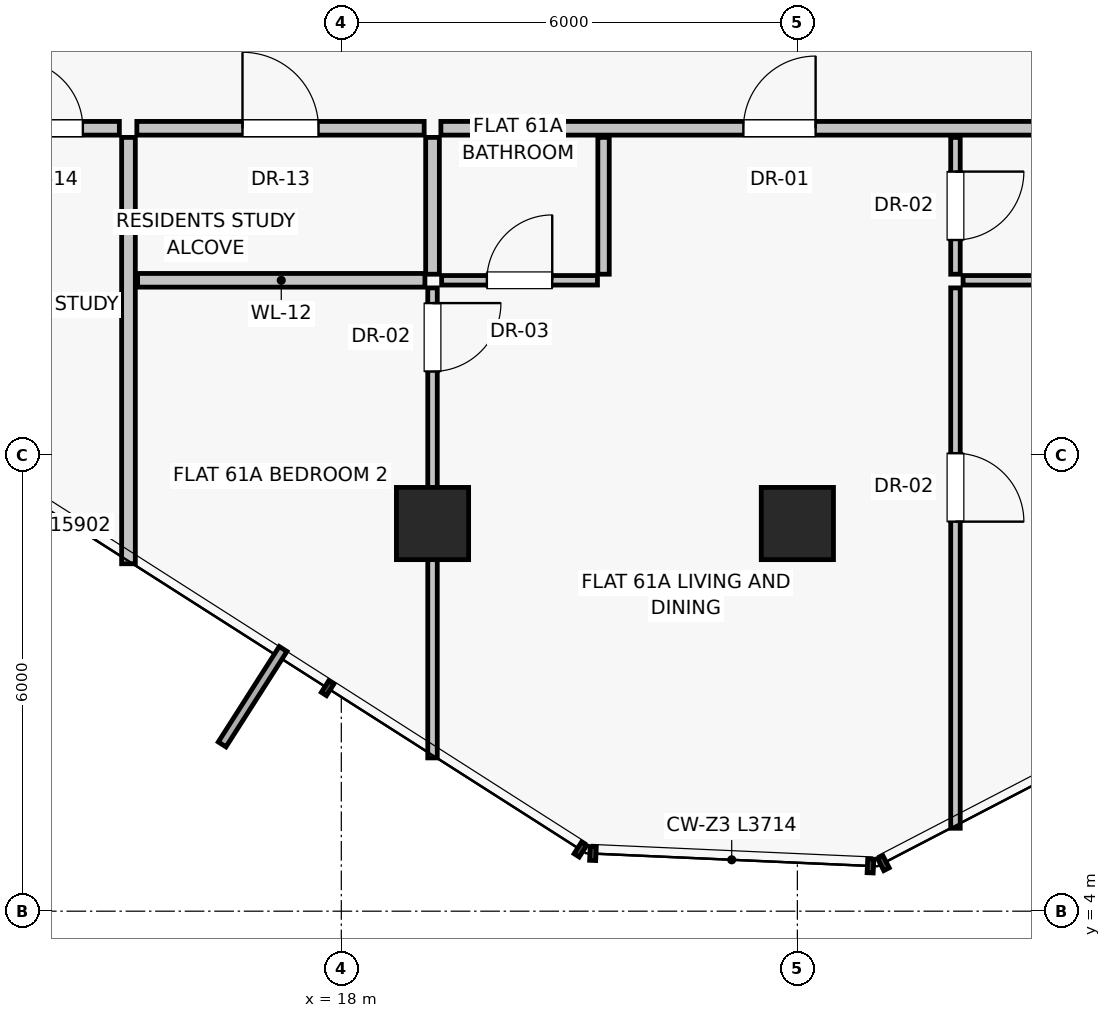
"""IFC4 building model, lengths in metres.
Left out: names, types, materials, properties, quantities, classifications, styles, units other than length and angle.
Written with IfcOpenShell. Run it as: python <this file> out.ifc"""

import sys

from ifc_helpers import new_model, si_unit, direction, frame, frame_2d, origin, origin_2d, place, context, subcontext, project, spatial, rectangle, extrude, source, transform, mapped, element, fill, save


model = new_model("IFC4")
c1 = context("Model", 3, precision=1e-05, world=origin(), true_north=direction((0.0, 1.0)))
c2 = subcontext(c1, "Body", "Model", "MODEL_VIEW")
j1 = project(units=[si_unit("LENGTHUNIT", "METRE"), si_unit("PLANEANGLEUNIT", "RADIAN")], contexts=[c1])
p1 = place(None, origin())
s1 = spatial("IfcSite", under=j1, at=p1, CompositionType="ELEMENT")
p2 = place(p1, origin())
s2 = spatial("IfcBuilding", under=s1, at=p2, CompositionType="ELEMENT")
p3 = place(p2, frame((0.0, 0.0, 215.65)))
s3 = spatial("IfcBuildingStorey", under=s2, at=p3, CompositionType="ELEMENT", Elevation=215.65)
for number, where, z_axis, x_axis in (
    (1, (19.2, 9.1, 0.0), (0.0, 0.0, 1.0), (1.0, 0.0, 0.0)),
    (2, (24.0, 9.1, 0.0), (0.0, 0.0, 1.0), (1.0, 0.0, 0.0)),
):
    element("IfcColumn", number, at=place(p3, frame(where, z_axis=z_axis, x_axis=x_axis)), inside=s3, PredefinedType="COLUMN", context=c2, shape_type="SweptSolid", body=[
        extrude(rectangle(XDim=0.95, YDim=0.95, at=origin_2d()), origin(), (0.0, 0.0, 1.0), 3.25),
    ])
p4 = place(p3, frame((15.2, 14.18, 0.0), z_axis=(0.0, 0.0, 1.0), x_axis=(0.0, -1.0, 0.0)))
e3 = element("IfcWall", 3, at=p4, inside=s3, PredefinedType="PARTITIONING", context=c2, shape_type="SweptSolid", body=[
    extrude(rectangle(XDim=5.609, YDim=0.18, at=frame_2d((2.805, 0.0))), origin(), (0.0, 0.0, 1.0), 3.015),
])
p5 = place(p3, frame((15.31, 14.3, 0.0), z_axis=(0.0, 0.0, 1.0), x_axis=(1.0, 0.0, 0.0)))
e4 = element("IfcWall", 4, at=p5, inside=s3, PredefinedType="PARTITIONING", context=c2, shape_type="SweptSolid", body=[
    extrude(rectangle(XDim=3.78, YDim=0.18, at=frame_2d((1.89, 0.0))), origin(), (0.0, 0.0, 1.0), 3.015),
])
p6 = place(p5, frame((1.39, 0.0, 0.0)))
e5 = element("IfcOpeningElement", 5, at=p6, cuts=e4, PredefinedType="OPENING", context=c2, shape_type="SweptSolid", body=[
    extrude(rectangle(XDim=1.0, YDim=2.01, at=frame_2d((0.5, 1.005))), frame((0.0, 0.1, 0.0), z_axis=(0.0, -1.0, 0.0), x_axis=(1.0, 0.0, 0.0)), (0.0, 0.0, 1.0), 0.2),
])
p7 = place(p3, frame((19.31, 14.3, 0.0), z_axis=(0.0, 0.0, 1.0), x_axis=(1.0, 0.0, 0.0)))
e6 = element("IfcWall", 6, at=p7, inside=s3, PredefinedType="PARTITIONING", context=c2, shape_type="SweptSolid", body=[
    extrude(rectangle(XDim=11.78, YDim=0.18, at=frame_2d((5.89, 0.0))), origin(), (0.0, 0.0, 1.0), 3.015),
])
p8 = place(p7, frame((3.98, 0.0, 0.0)))
e7 = element("IfcOpeningElement", 7, at=p8, cuts=e6, PredefinedType="OPENING", context=c2, shape_type="SweptSolid", body=[
    extrude(rectangle(XDim=0.95, YDim=2.02, at=frame_2d((0.475, 1.01))), frame((0.0, 0.1, 0.0), z_axis=(0.0, -1.0, 0.0), x_axis=(1.0, 0.0, 0.0)), (0.0, 0.0, 1.0), 0.2),
])
p9 = place(p3, frame((15.32, 12.3, 0.0), z_axis=(0.0, 0.0, 1.0), x_axis=(1.0, 0.0, 0.0)))
e8 = element("IfcWall", 8, at=p9, inside=s3, PredefinedType="PARTITIONING", context=c2, shape_type="SweptSolid", body=[
    extrude(rectangle(XDim=3.78, YDim=0.18, at=frame_2d((1.89, 0.0))), origin(), (0.0, 0.0, 1.0), 3.015),
])
p10 = place(p3, frame((19.2, 14.18, 0.0), z_axis=(0.0, 0.0, 1.0), x_axis=(0.0, -1.0, 0.0)))
e9 = element("IfcWall", 9, at=p10, inside=s3, PredefinedType="PARTITIONING", context=c2, shape_type="SweptSolid", body=[
    extrude(rectangle(XDim=1.8, YDim=0.18, at=frame_2d((0.9, 0.0))), origin(), (0.0, 0.0, 1.0), 3.015),
])
p11 = place(p3, frame((19.2, 12.2, 0.0), z_axis=(0.0, 0.0, 1.0), x_axis=(0.0, -1.0, 0.0)))
e10 = element("IfcWall", 10, at=p11, inside=s3, PredefinedType="PARTITIONING", context=c2, shape_type="SweptSolid", body=[
    extrude(rectangle(XDim=6.183, YDim=0.125, at=frame_2d((3.092, 0.0))), origin(), (0.0, 0.0, 1.0), 2.469),
])
p12 = place(p11, frame((0.2, 0.0, 0.0)))
e11 = element("IfcOpeningElement", 11, at=p12, cuts=e10, PredefinedType="OPENING", context=c2, shape_type="SweptSolid", body=[
    extrude(rectangle(XDim=0.9, YDim=2.01, at=frame_2d((0.45, 1.005))), frame((0.0, 0.073, 0.0), z_axis=(0.0, -1.0, 0.0), x_axis=(1.0, 0.0, 0.0)), (0.0, 0.0, 1.0), 0.145),
])
p13 = place(p3, frame((21.45, 14.18, 0.0), z_axis=(0.0, 0.0, 1.0), x_axis=(0.0, -1.0, 0.0)))
e12 = element("IfcWall", 12, at=p13, inside=s3, PredefinedType="PARTITIONING", context=c2, shape_type="SweptSolid", body=[
    extrude(rectangle(XDim=1.8, YDim=0.15, at=frame_2d((0.9, 0.0))), origin(), (0.0, 0.0, 1.0), 3.015),
])
p14 = place(p3, frame((19.32, 12.3, 0.0), z_axis=(0.0, 0.0, 1.0), x_axis=(1.0, 0.0, 0.0)))
e13 = element("IfcWall", 13, at=p14, inside=s3, PredefinedType="PARTITIONING", context=c2, shape_type="SweptSolid", body=[
    extrude(rectangle(XDim=2.05, YDim=0.125, at=frame_2d((1.025, 0.0))), origin(), (0.0, 0.0, 1.0), 3.015),
])
p15 = place(p14, frame((0.595, 0.0, 0.0)))
e14 = element("IfcOpeningElement", 14, at=p15, cuts=e13, PredefinedType="OPENING", context=c2, shape_type="SweptSolid", body=[
    extrude(rectangle(XDim=0.86, YDim=2.01, at=frame_2d((0.43, 1.005))), frame((0.0, 0.073, 0.0), z_axis=(0.0, -1.0, 0.0), x_axis=(1.0, 0.0, 0.0)), (0.0, 0.0, 1.0), 0.145),
])
p16 = place(p3, frame((26.08, 14.18, 0.0), z_axis=(0.0, 0.0, 1.0), x_axis=(0.0, -1.0, 0.0)))
e15 = element("IfcWall", 15, at=p16, inside=s3, PredefinedType="PARTITIONING", context=c2, shape_type="SweptSolid", body=[
    extrude(rectangle(XDim=1.8, YDim=0.125, at=frame_2d((0.9, 0.0))), origin(), (0.0, 0.0, 1.0), 3.015),
])
p17 = place(p16, frame((0.45, 0.0, 0.0)))
e16 = element("IfcOpeningElement", 16, at=p17, cuts=e15, PredefinedType="OPENING", context=c2, shape_type="SweptSolid", body=[
    extrude(rectangle(XDim=0.9, YDim=2.01, at=frame_2d((0.45, 1.005))), frame((0.0, 0.073, 0.0), z_axis=(0.0, -1.0, 0.0), x_axis=(1.0, 0.0, 0.0)), (0.0, 0.0, 1.0), 0.145),
])
p18 = place(p3, frame((26.18, 12.3, 0.0), z_axis=(0.0, 0.0, 1.0), x_axis=(1.0, 0.0, 0.0)))
e17 = element("IfcWall", 17, at=p18, inside=s3, PredefinedType="PARTITIONING", context=c2, shape_type="SweptSolid", body=[
    extrude(rectangle(XDim=4.9, YDim=0.125, at=frame_2d((2.45, 0.0))), origin(), (0.0, 0.0, 1.0), 3.015),
])
p19 = place(p3, frame((26.08, 12.2, 0.0), z_axis=(0.0, 0.0, 1.0), x_axis=(0.0, -1.0, 0.0)))
e18 = element("IfcWall", 18, at=p19, inside=s3, PredefinedType="PARTITIONING", context=c2, shape_type="SweptSolid", body=[
    extrude(rectangle(XDim=7.109, YDim=0.125, at=frame_2d((3.555, 0.0))), origin(), (0.0, 0.0, 1.0), 3.015),
])
p20 = place(p19, frame((2.175, 0.0, 0.0)))
e19 = element("IfcOpeningElement", 19, at=p20, cuts=e18, PredefinedType="OPENING", context=c2, shape_type="SweptSolid", body=[
    extrude(rectangle(XDim=0.9, YDim=2.01, at=frame_2d((0.45, 1.005))), frame((0.0, 0.073, 0.0), z_axis=(0.0, -1.0, 0.0), x_axis=(1.0, 0.0, 0.0)), (0.0, 0.0, 1.0), 0.145),
])
p21 = place(p3, frame((13.22, 14.3, 0.0), z_axis=(0.0, 0.0, 1.0), x_axis=(1.0, 0.0, 0.0)))
e20 = element("IfcWall", 20, at=p21, inside=s3, PredefinedType="PARTITIONING", context=c2, shape_type="SweptSolid", body=[
    extrude(rectangle(XDim=1.86, YDim=0.18, at=frame_2d((0.93, 0.0))), origin(), (0.0, 0.0, 1.0), 3.015),
])
p22 = place(p21, frame((0.48, 0.0, 0.0)))
e21 = element("IfcOpeningElement", 21, at=p22, cuts=e20, PredefinedType="OPENING", context=c2, shape_type="SweptSolid", body=[
    extrude(rectangle(XDim=0.9, YDim=2.01, at=frame_2d((0.45, 1.005))), frame((0.0, 0.1, 0.0), z_axis=(0.0, -1.0, 0.0), x_axis=(1.0, 0.0, 0.0)), (0.0, 0.0, 1.0), 0.2),
])
m1 = source(origin(), c2, "Body", "SweptSolid", [
    extrude(rectangle(XDim=1.0, YDim=2.01, at=frame_2d((0.5, 1.005))), frame((0.0, 0.025, 0.0), z_axis=(0.0, -1.0, 0.0), x_axis=(1.0, 0.0, 0.0)), (0.0, 0.0, 1.0), 0.05),
])
p23 = place(p6, origin())
e22 = element("IfcDoor", 22, at=p23, inside=s3, OperationType="SINGLE_SWING_LEFT", PredefinedType="DOOR", context=c2, shape_type="MappedRepresentation", body=[
    mapped(m1, transform((0.0, 0.0, 0.0), scale=1.0)),
])
fill(e5, e22)
m2 = source(origin(), c2, "Body", "SweptSolid", [
    extrude(rectangle(XDim=0.95, YDim=2.02, at=frame_2d((0.475, 1.01))), frame((0.0, 0.025, 0.0), z_axis=(0.0, -1.0, 0.0), x_axis=(1.0, 0.0, 0.0)), (0.0, 0.0, 1.0), 0.05),
])
p24 = place(p8, origin())
e23 = element("IfcDoor", 23, at=p24, inside=s3, OperationType="SINGLE_SWING_RIGHT", PredefinedType="DOOR", context=c2, shape_type="MappedRepresentation", body=[
    mapped(m2, transform((0.0, 0.0, 0.0), scale=1.0)),
])
fill(e7, e23)
m3 = source(origin(), c2, "Body", "SweptSolid", [
    extrude(rectangle(XDim=0.9, YDim=2.01, at=frame_2d((0.45, 1.005))), frame((0.0, 0.025, 0.0), z_axis=(0.0, -1.0, 0.0), x_axis=(1.0, 0.0, 0.0)), (0.0, 0.0, 1.0), 0.05),
])
p25 = place(p12, origin())
e24 = element("IfcDoor", 24, at=p25, inside=s3, OperationType="SINGLE_SWING_LEFT", PredefinedType="DOOR", context=c2, shape_type="MappedRepresentation", body=[
    mapped(m3, transform((0.0, 0.0, 0.0), scale=1.0)),
])
fill(e11, e24)
m4 = source(origin(), c2, "Body", "SweptSolid", [
    extrude(rectangle(XDim=0.86, YDim=2.01, at=frame_2d((0.43, 1.005))), frame((0.0, 0.025, 0.0), z_axis=(0.0, -1.0, 0.0), x_axis=(1.0, 0.0, 0.0)), (0.0, 0.0, 1.0), 0.05),
])
p26 = place(p15, origin())
e25 = element("IfcDoor", 25, at=p26, inside=s3, OperationType="SINGLE_SWING_RIGHT", PredefinedType="DOOR", context=c2, shape_type="MappedRepresentation", body=[
    mapped(m4, transform((0.0, 0.0, 0.0), scale=1.0)),
])
fill(e14, e25)
p27 = place(p17, origin())
e26 = element("IfcDoor", 26, at=p27, inside=s3, OperationType="SINGLE_SWING_LEFT", PredefinedType="DOOR", context=c2, shape_type="MappedRepresentation", body=[
    mapped(m3, transform((0.0, 0.0, 0.0), scale=1.0)),
])
fill(e16, e26)
p28 = place(p20, origin())
e27 = element("IfcDoor", 27, at=p28, inside=s3, OperationType="SINGLE_SWING_RIGHT", PredefinedType="DOOR", context=c2, shape_type="MappedRepresentation", body=[
    mapped(m3, transform((0.0, 0.0, 0.0), scale=1.0)),
])
fill(e19, e27)
p29 = place(p22, origin())
e28 = element("IfcDoor", 28, at=p29, inside=s3, OperationType="SINGLE_SWING_LEFT", PredefinedType="DOOR", context=c2, shape_type="MappedRepresentation", body=[
    mapped(m3, transform((0.0, 0.0, 0.0), scale=1.0)),
])
fill(e21, e28)
save(model, sys.argv[1])
